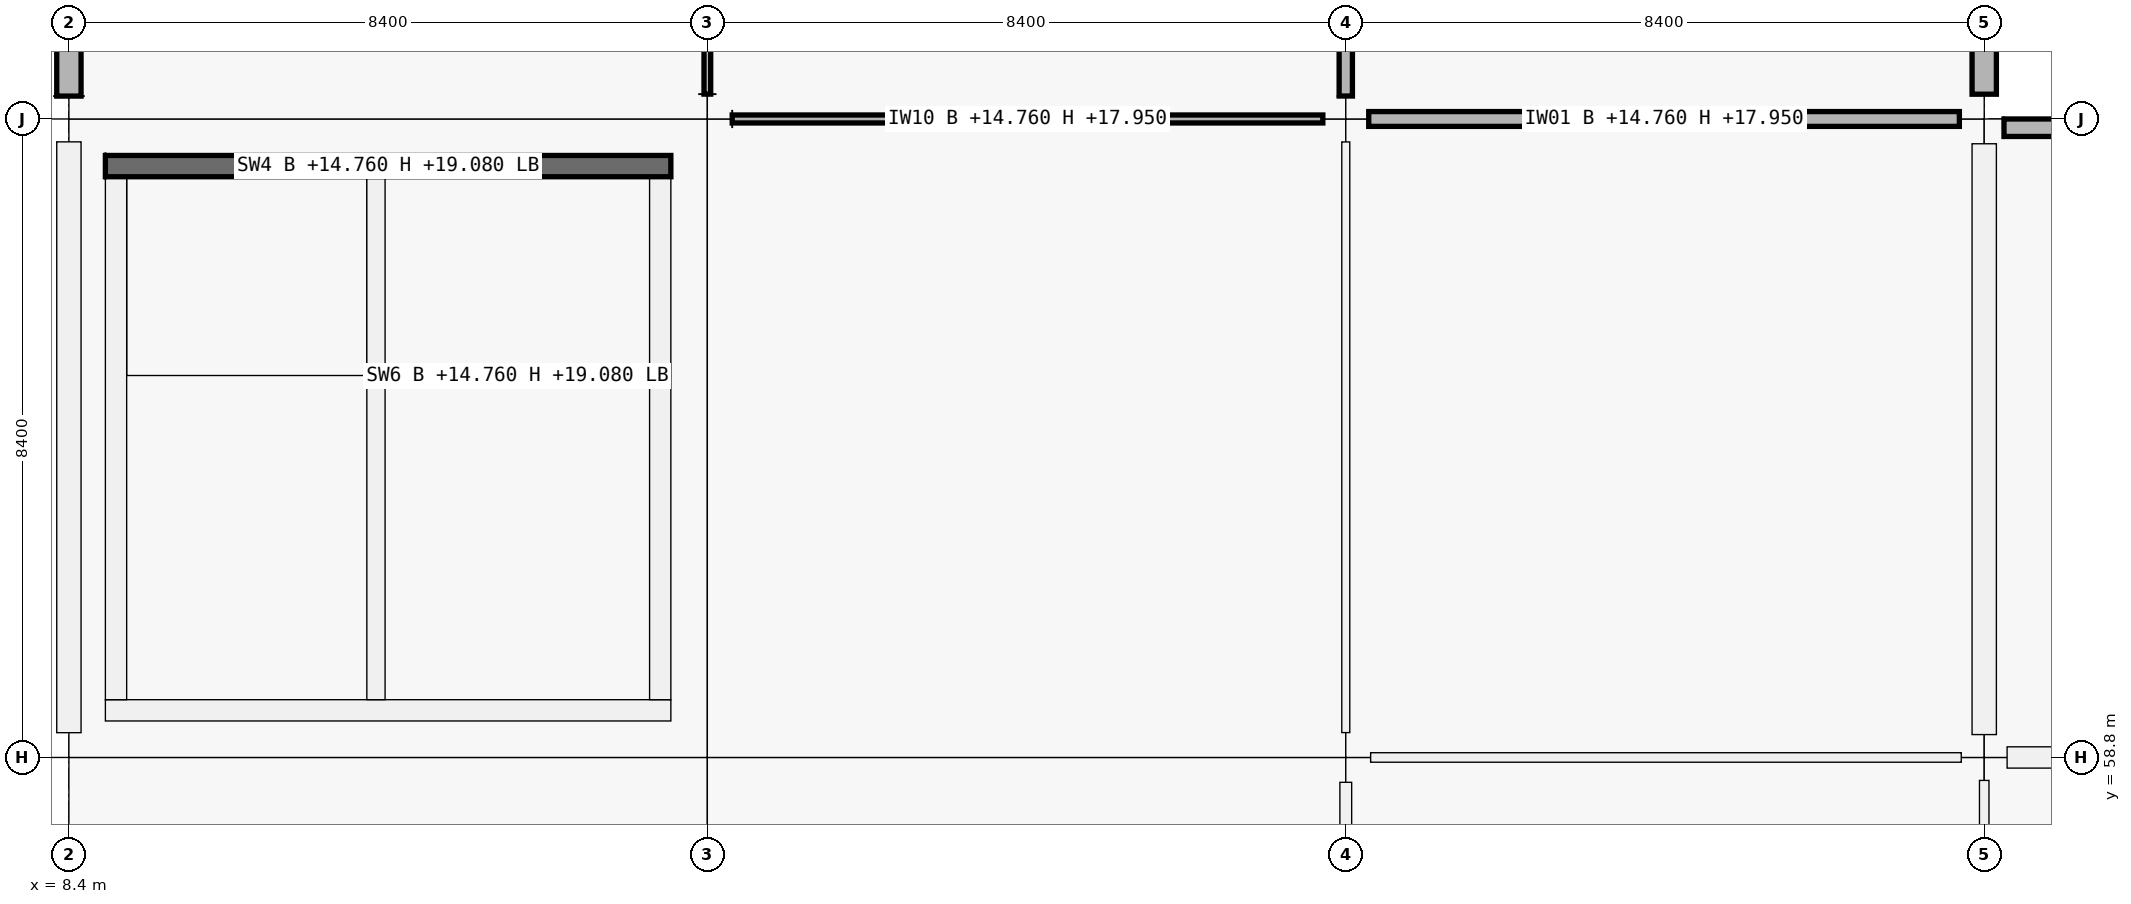
"""IFC4 building model, lengths in metres.
Left out: names, types, materials, properties, quantities, classifications, styles, units other than length and angle.
Written with IfcOpenShell. Run it as: python <this file> out.ifc"""

import sys

from ifc_helpers import new_model, si_unit, direction, frame, frame_2d, origin, origin_2d, place, context, subcontext, project, spatial, rectangle, extrude, element, fill, save


model = new_model("IFC4")
c1 = context("Model", 3, precision=1e-05, world=origin(), true_north=direction((0.0, 1.0)))
c2 = subcontext(c1, "Body", "Model", "MODEL_VIEW")
j1 = project(units=[si_unit("LENGTHUNIT", "METRE"), si_unit("PLANEANGLEUNIT", "RADIAN")], contexts=[c1])
p1 = place(None, origin())
s1 = spatial("IfcSite", under=j1, at=p1, CompositionType="ELEMENT")
p2 = place(p1, origin())
s2 = spatial("IfcBuilding", under=s1, at=p2, CompositionType="ELEMENT")
p3 = place(p2, frame((0.0, 0.0, 14.76)))
s3 = spatial("IfcBuildingStorey", under=s2, at=p3, CompositionType="ELEMENT", Elevation=14.76)
p4 = place(p3, frame((8.4, 58.8, 0.0), z_axis=(0.0, 0.0, 1.0), x_axis=(1.0, 0.0, 0.0)))
e1 = element("IfcColumn", 1, at=p4, inside=s3, PredefinedType="COLUMN", context=c2, shape_type="SweptSolid", body=[
    extrude(rectangle(XDim=0.65, YDim=0.65, at=origin_2d()), origin(), (0.0, 0.0, 1.0), 4.32),
])
for number, where, z_axis, x_axis in (
    (2, (8.4, 67.2, 0.0), (0.0, 0.0, 1.0), (1.0, 0.0, 0.0)),
    (3, (16.8, 58.8, 0.0), (0.0, 0.0, 1.0), (1.0, 0.0, 0.0)),
):
    element("IfcColumn", number, at=place(p3, frame(where, z_axis=z_axis, x_axis=x_axis)), inside=s3, PredefinedType="COLUMN", context=c2, shape_type="SweptSolid", body=[
        extrude(rectangle(XDim=0.6, YDim=0.6, at=origin_2d()), origin(), (0.0, 0.0, 1.0), 4.32),
    ])
for number, where, z_axis, x_axis in (
    (4, (16.8, 67.2, 0.0), (0.0, 0.0, 1.0), (1.0, 0.0, 0.0)),
    (5, (25.2, 58.8, 0.0), (0.0, 0.0, 1.0), (1.0, 0.0, 0.0)),
):
    element("IfcColumn", number, at=place(p3, frame(where, z_axis=z_axis, x_axis=x_axis)), inside=s3, PredefinedType="COLUMN", context=c2, shape_type="SweptSolid", body=[
        extrude(rectangle(XDim=0.65, YDim=0.65, at=origin_2d()), origin(), (0.0, 0.0, 1.0), 4.32),
    ])
for number, where, z_axis, x_axis in (
    (6, (25.2, 67.2, 0.0), (0.0, 0.0, 1.0), (1.0, 0.0, 0.0)),
    (7, (33.6, 58.8, 0.0), (0.0, 0.0, 1.0), (1.0, 0.0, 0.0)),
):
    element("IfcColumn", number, at=place(p3, frame(where, z_axis=z_axis, x_axis=x_axis)), inside=s3, PredefinedType="COLUMN", context=c2, shape_type="SweptSolid", body=[
        extrude(rectangle(XDim=0.6, YDim=0.6, at=origin_2d()), origin(), (0.0, 0.0, 1.0), 4.32),
    ])
p5 = place(p3, frame((33.6, 67.2, 0.0), z_axis=(0.0, 0.0, 1.0), x_axis=(1.0, 0.0, 0.0)))
e8 = element("IfcColumn", 8, at=p5, inside=s3, PredefinedType="COLUMN", context=c2, shape_type="SweptSolid", body=[
    extrude(rectangle(XDim=0.65, YDim=0.65, at=origin_2d()), origin(), (0.0, 0.0, 1.0), 4.32),
])
p6 = place(p3, frame((8.4, 59.126, 0.0), z_axis=(0.0, 0.0, 1.0), x_axis=(0.0, 1.0, 0.0)))
e9 = element("IfcWall", 9, at=p6, inside=s3, PredefinedType="SOLIDWALL", context=c2, shape_type="SweptSolid", body=[
    extrude(rectangle(XDim=7.773, YDim=0.32, at=frame_2d((3.886, 0.0))), origin(), (0.0, 0.0, 1.0), 3.37),
])
p7 = place(p3, frame((8.4, 67.501, 0.0), z_axis=(0.0, 0.0, 1.0), x_axis=(0.0, 1.0, 0.0)))
e10 = element("IfcWall", 10, at=p7, inside=s3, PredefinedType="SOLIDWALL", context=c2, shape_type="SweptSolid", body=[
    extrude(rectangle(XDim=7.773, YDim=0.32, at=frame_2d((3.886, 0.0))), origin(), (0.0, 0.0, 1.0), 3.37),
])
p8 = place(p7, frame((2.786, 0.0, 0.9)))
e11 = element("IfcOpeningElement", 11, at=p8, cuts=e10, PredefinedType="OPENING", context=c2, shape_type="SweptSolid", body=[
    extrude(rectangle(XDim=2.2, YDim=1.35, at=frame_2d((1.1, 0.675))), frame((0.0, 0.16, 0.0), z_axis=(0.0, -1.0, 0.0), x_axis=(1.0, 0.0, 0.0)), (0.0, 0.0, 1.0), 0.32),
])
p9 = place(p3, frame((33.6, 66.874, 0.0), z_axis=(0.0, 0.0, 1.0), x_axis=(0.0, -1.0, 0.0)))
e12 = element("IfcWall", 12, at=p9, inside=s3, PredefinedType="SOLIDWALL", context=c2, shape_type="SweptSolid", body=[
    extrude(rectangle(XDim=7.773, YDim=0.32, at=frame_2d((3.886, 0.0))), origin(), (0.0, 0.0, 1.0), 3.37),
])
p10 = place(p9, frame((2.286, 0.0, 0.9)))
e13 = element("IfcOpeningElement", 13, at=p10, cuts=e12, PredefinedType="OPENING", context=c2, shape_type="SweptSolid", body=[
    extrude(rectangle(XDim=3.2, YDim=1.75, at=frame_2d((1.6, 0.875))), frame((0.0, 0.16, 0.0), z_axis=(0.0, -1.0, 0.0), x_axis=(1.0, 0.0, 0.0)), (0.0, 0.0, 1.0), 0.32),
])
p11 = place(p3, frame((33.6, 75.299, 0.0), z_axis=(0.0, 0.0, 1.0), x_axis=(0.0, -1.0, 0.0)))
e14 = element("IfcWall", 14, at=p11, inside=s3, PredefinedType="SOLIDWALL", context=c2, shape_type="SweptSolid", body=[
    extrude(rectangle(XDim=7.773, YDim=0.32, at=frame_2d((3.887, 0.0))), origin(), (0.0, 0.0, 1.0), 3.37),
])
p12 = place(p3, frame((33.901, 58.8, 0.0), z_axis=(0.0, 0.0, 1.0), x_axis=(1.0, 0.0, 0.0)))
e15 = element("IfcWall", 15, at=p12, inside=s3, PredefinedType="SOLIDWALL", context=c2, shape_type="SweptSolid", body=[
    extrude(rectangle(XDim=7.823, YDim=0.28, at=frame_2d((3.912, 0.0))), origin(), (0.0, 0.0, 1.0), 3.37),
])
p13 = place(p3, frame((33.86, 67.085, 0.0), z_axis=(0.0, 0.0, 1.0), x_axis=(1.0, 0.0, 0.0)))
e16 = element("IfcWall", 16, at=p13, inside=s3, PredefinedType="PARAPET", context=c2, shape_type="SweptSolid", body=[
    extrude(rectangle(XDim=7.88, YDim=0.23, at=frame_2d((3.94, 0.0))), origin(), (0.0, 0.0, 1.0), 0.95),
])
p14 = place(p3, frame((16.32, 59.42, 0.0), z_axis=(0.0, 0.0, 1.0), x_axis=(-1.0, 0.0, 0.0)))
e17 = element("IfcWall", 17, at=p14, inside=s3, PredefinedType="SHEAR", context=c2, shape_type="SweptSolid", body=[
    extrude(rectangle(XDim=7.44, YDim=0.28, at=frame_2d((3.72, 0.0))), origin(), (0.0, 0.0, 1.0), 4.32),
])
p15 = place(p14, frame((1.28, 0.0, 0.0)))
e18 = element("IfcOpeningElement", 18, at=p15, cuts=e17, PredefinedType="OPENING", context=c2, shape_type="SweptSolid", body=[
    extrude(rectangle(XDim=1.5, YDim=2.15, at=frame_2d((0.75, 1.075))), frame((0.0, 0.14, 0.0), z_axis=(0.0, -1.0, 0.0), x_axis=(1.0, 0.0, 0.0)), (0.0, 0.0, 1.0), 0.28),
])
p16 = place(p3, frame((9.02, 59.56, 0.0), z_axis=(0.0, 0.0, 1.0), x_axis=(0.0, 1.0, 0.0)))
e19 = element("IfcWall", 19, at=p16, inside=s3, PredefinedType="SHEAR", context=c2, shape_type="SweptSolid", body=[
    extrude(rectangle(XDim=6.88, YDim=0.28, at=frame_2d((3.44, 0.0))), origin(), (0.0, 0.0, 1.0), 4.32),
])
p17 = place(p3, frame((8.88, 66.58, 0.0), z_axis=(0.0, 0.0, 1.0), x_axis=(1.0, 0.0, 0.0)))
e20 = element("IfcWall", 20, at=p17, inside=s3, PredefinedType="SHEAR", context=c2, shape_type="SweptSolid", body=[
    extrude(rectangle(XDim=7.44, YDim=0.28, at=frame_2d((3.72, 0.0))), origin(), (0.0, 0.0, 1.0), 4.32),
])
p18 = place(p3, frame((16.18, 66.44, 0.0), z_axis=(0.0, 0.0, 1.0), x_axis=(0.0, -1.0, 0.0)))
e21 = element("IfcWall", 21, at=p18, inside=s3, PredefinedType="SHEAR", context=c2, shape_type="SweptSolid", body=[
    extrude(rectangle(XDim=6.88, YDim=0.28, at=frame_2d((3.44, 0.0))), origin(), (0.0, 0.0, 1.0), 4.32),
])
p19 = place(p3, frame((12.44, 59.56, 0.0), z_axis=(0.0, 0.0, 1.0), x_axis=(0.0, 1.0, 0.0)))
e22 = element("IfcWall", 22, at=p19, inside=s3, PredefinedType="SHEAR", context=c2, shape_type="SweptSolid", body=[
    extrude(rectangle(XDim=6.88, YDim=0.24, at=frame_2d((3.44, 0.0))), origin(), (0.0, 0.0, 1.0), 4.32),
])
p20 = place(p19, frame((0.12, 0.0, 0.0)))
e23 = element("IfcOpeningElement", 23, at=p20, cuts=e22, PredefinedType="OPENING", context=c2, shape_type="SweptSolid", body=[
    extrude(rectangle(XDim=1.0, YDim=2.15, at=frame_2d((0.5, 1.075))), frame((0.0, 0.12, 0.0), z_axis=(0.0, -1.0, 0.0), x_axis=(1.0, 0.0, 0.0)), (0.0, 0.0, 1.0), 0.24),
])
p21 = place(p3, frame((12.56, 63.82, 0.0), z_axis=(0.0, 0.0, 1.0), x_axis=(1.0, 0.0, 0.0)))
e24 = element("IfcWall", 24, at=p21, inside=s3, PredefinedType="SHEAR", context=c2, shape_type="SweptSolid", body=[
    extrude(rectangle(XDim=3.48, YDim=0.24, at=frame_2d((1.74, 0.0))), origin(), (0.0, 0.0, 1.0), 4.32),
])
p22 = place(p21, frame((1.19, 0.0, 0.0)))
e25 = element("IfcOpeningElement", 25, at=p22, cuts=e24, PredefinedType="OPENING", context=c2, shape_type="SweptSolid", body=[
    extrude(rectangle(XDim=1.1, YDim=2.15, at=frame_2d((0.55, 1.075))), frame((0.0, 0.12, 0.0), z_axis=(0.0, -1.0, 0.0), x_axis=(1.0, 0.0, 0.0)), (0.0, 0.0, 1.0), 0.24),
])
p23 = place(p3, frame((17.127, 67.2, 0.0), z_axis=(0.0, 0.0, 1.0), x_axis=(1.0, 0.0, 0.0)))
e26 = element("IfcWall", 26, at=p23, inside=s3, PredefinedType="PARTITIONING", context=c2, shape_type="SweptSolid", body=[
    extrude(rectangle(XDim=7.771, YDim=0.105, at=frame_2d((3.885, 0.0))), origin(), (0.0, 0.0, 1.0), 3.19),
])
p24 = place(p23, frame((3.356, 0.0, 0.0)))
e27 = element("IfcOpeningElement", 27, at=p24, cuts=e26, PredefinedType="OPENING", context=c2, shape_type="SweptSolid", body=[
    extrude(rectangle(XDim=1.06, YDim=2.25, at=frame_2d((0.53, 1.125))), frame((0.0, 0.052, 0.0), z_axis=(0.0, -1.0, 0.0), x_axis=(1.0, 0.0, 0.0)), (0.0, 0.0, 1.0), 0.105),
])
p25 = place(p3, frame((25.527, 58.8, 0.0), z_axis=(0.0, 0.0, 1.0), x_axis=(1.0, 0.0, 0.0)))
e28 = element("IfcWall", 28, at=p25, inside=s3, PredefinedType="PARTITIONING", context=c2, shape_type="SweptSolid", body=[
    extrude(rectangle(XDim=7.771, YDim=0.125, at=frame_2d((3.885, 0.0))), origin(), (0.0, 0.0, 1.0), 3.19),
])
p26 = place(p25, frame((3.401, 0.0, 0.0)))
e29 = element("IfcOpeningElement", 29, at=p26, cuts=e28, PredefinedType="OPENING", context=c2, shape_type="SweptSolid", body=[
    extrude(rectangle(XDim=0.97, YDim=2.12, at=frame_2d((0.485, 1.06))), frame((0.0, 0.062, 0.0), z_axis=(0.0, -1.0, 0.0), x_axis=(1.0, 0.0, 0.0)), (0.0, 0.0, 1.0), 0.125),
])
p27 = place(p3, frame((25.502, 67.2, 0.0), z_axis=(0.0, 0.0, 1.0), x_axis=(1.0, 0.0, 0.0)))
e30 = element("IfcWall", 30, at=p27, inside=s3, PredefinedType="PARTITIONING", context=c2, shape_type="SweptSolid", body=[
    extrude(rectangle(XDim=7.771, YDim=0.195, at=frame_2d((3.885, 0.0))), origin(), (0.0, 0.0, 1.0), 3.19),
])
p28 = place(p27, frame((3.401, 0.0, 0.0)))
e31 = element("IfcOpeningElement", 31, at=p28, cuts=e30, PredefinedType="OPENING", context=c2, shape_type="SweptSolid", body=[
    extrude(rectangle(XDim=0.97, YDim=2.12, at=frame_2d((0.485, 1.06))), frame((0.0, 0.098, 0.0), z_axis=(0.0, -1.0, 0.0), x_axis=(1.0, 0.0, 0.0)), (0.0, 0.0, 1.0), 0.195),
])
p29 = place(p3, frame((16.8, 67.527, 0.0), z_axis=(0.0, 0.0, 1.0), x_axis=(0.0, 1.0, 0.0)))
e32 = element("IfcWall", 32, at=p29, inside=s3, PredefinedType="PARTITIONING", context=c2, shape_type="SweptSolid", body=[
    extrude(rectangle(XDim=7.771, YDim=0.088, at=frame_2d((3.885, 0.0))), origin(), (0.0, 0.0, 1.0), 3.19),
])
p30 = place(p29, frame((3.356, 0.0, 0.0)))
e33 = element("IfcOpeningElement", 33, at=p30, cuts=e32, PredefinedType="OPENING", context=c2, shape_type="SweptSolid", body=[
    extrude(rectangle(XDim=1.06, YDim=2.25, at=frame_2d((0.53, 1.125))), frame((0.0, 0.044, 0.0), z_axis=(0.0, -1.0, 0.0), x_axis=(1.0, 0.0, 0.0)), (0.0, 0.0, 1.0), 0.088),
])
p31 = place(p3, frame((25.2, 50.702, 0.0), z_axis=(0.0, 0.0, 1.0), x_axis=(0.0, 1.0, 0.0)))
e34 = element("IfcWall", 34, at=p31, inside=s3, PredefinedType="PARTITIONING", context=c2, shape_type="SweptSolid", body=[
    extrude(rectangle(XDim=7.771, YDim=0.155, at=frame_2d((3.885, 0.0))), origin(), (0.0, 0.0, 1.0), 3.19),
])
p32 = place(p31, frame((3.385, 0.0, 0.0)))
e35 = element("IfcOpeningElement", 35, at=p32, cuts=e34, PredefinedType="OPENING", context=c2, shape_type="SweptSolid", body=[
    extrude(rectangle(XDim=1.0, YDim=2.2, at=frame_2d((0.5, 1.1))), frame((0.0, 0.078, 0.0), z_axis=(0.0, -1.0, 0.0), x_axis=(1.0, 0.0, 0.0)), (0.0, 0.0, 1.0), 0.155),
])
p33 = place(p3, frame((25.2, 59.127, 0.0), z_axis=(0.0, 0.0, 1.0), x_axis=(0.0, 1.0, 0.0)))
e36 = element("IfcWall", 36, at=p33, inside=s3, PredefinedType="PARTITIONING", context=c2, shape_type="SweptSolid", body=[
    extrude(rectangle(XDim=7.771, YDim=0.105, at=frame_2d((3.885, 0.0))), origin(), (0.0, 0.0, 1.0), 3.19),
])
p34 = place(p33, frame((3.396, 0.0, 0.0)))
e37 = element("IfcOpeningElement", 37, at=p34, cuts=e36, PredefinedType="OPENING", context=c2, shape_type="SweptSolid", body=[
    extrude(rectangle(XDim=0.98, YDim=2.18, at=frame_2d((0.49, 1.09))), frame((0.0, 0.052, 0.0), z_axis=(0.0, -1.0, 0.0), x_axis=(1.0, 0.0, 0.0)), (0.0, 0.0, 1.0), 0.105),
])
p35 = place(p3, frame((25.2, 67.502, 0.0), z_axis=(0.0, 0.0, 1.0), x_axis=(0.0, 1.0, 0.0)))
e38 = element("IfcWall", 38, at=p35, inside=s3, PredefinedType="PARTITIONING", context=c2, shape_type="SweptSolid", body=[
    extrude(rectangle(XDim=7.771, YDim=0.175, at=frame_2d((3.885, 0.0))), origin(), (0.0, 0.0, 1.0), 3.19),
])
p36 = place(p35, frame((3.356, 0.0, 0.0)))
e39 = element("IfcOpeningElement", 39, at=p36, cuts=e38, PredefinedType="OPENING", context=c2, shape_type="SweptSolid", body=[
    extrude(rectangle(XDim=1.06, YDim=2.25, at=frame_2d((0.53, 1.125))), frame((0.0, 0.087, 0.0), z_axis=(0.0, -1.0, 0.0), x_axis=(1.0, 0.0, 0.0)), (0.0, 0.0, 1.0), 0.175),
])
p37 = place(p3, frame((33.6, 50.727, 0.0), z_axis=(0.0, 0.0, 1.0), x_axis=(0.0, 1.0, 0.0)))
e40 = element("IfcWall", 40, at=p37, inside=s3, PredefinedType="PARTITIONING", context=c2, shape_type="SweptSolid", body=[
    extrude(rectangle(XDim=7.771, YDim=0.125, at=frame_2d((3.885, 0.0))), origin(), (0.0, 0.0, 1.0), 3.19),
])
p38 = place(p37, frame((3.365, 0.0, 0.0)))
e41 = element("IfcOpeningElement", 41, at=p38, cuts=e40, PredefinedType="OPENING", context=c2, shape_type="SweptSolid", body=[
    extrude(rectangle(XDim=1.04, YDim=2.2, at=frame_2d((0.52, 1.1))), frame((0.0, 0.062, 0.0), z_axis=(0.0, -1.0, 0.0), x_axis=(1.0, 0.0, 0.0)), (0.0, 0.0, 1.0), 0.125),
])
p39 = place(p10, origin())
e42 = element("IfcWindow", 42, at=p39, inside=s3, PartitioningType="SINGLE_PANEL", PredefinedType="WINDOW", context=c2, shape_type="SweptSolid", body=[
    extrude(rectangle(XDim=3.2, YDim=1.75, at=frame_2d((1.6, 0.875))), frame((0.0, 0.03, 0.0), z_axis=(0.0, -1.0, 0.0), x_axis=(1.0, 0.0, 0.0)), (0.0, 0.0, 1.0), 0.06),
])
fill(e13, e42)
p40 = place(p20, origin())
e43 = element("IfcDoor", 43, at=p40, inside=s3, OperationType="SINGLE_SWING_LEFT", PredefinedType="DOOR", context=c2, shape_type="SweptSolid", body=[
    extrude(rectangle(XDim=1.0, YDim=2.15, at=frame_2d((0.5, 1.075))), frame((0.0, 0.025, 0.0), z_axis=(0.0, -1.0, 0.0), x_axis=(1.0, 0.0, 0.0)), (0.0, 0.0, 1.0), 0.05),
])
fill(e23, e43)
p41 = place(p15, origin())
e44 = element("IfcDoor", 44, at=p41, inside=s3, OperationType="DOUBLE_DOOR_SINGLE_SWING", PredefinedType="DOOR", context=c2, shape_type="SweptSolid", body=[
    extrude(rectangle(XDim=1.5, YDim=2.15, at=frame_2d((0.75, 1.075))), frame((0.0, 0.025, 0.0), z_axis=(0.0, -1.0, 0.0), x_axis=(1.0, 0.0, 0.0)), (0.0, 0.0, 1.0), 0.05),
])
fill(e18, e44)
p42 = place(p22, origin())
e45 = element("IfcDoor", 45, at=p42, inside=s3, OperationType="DOUBLE_DOOR_SLIDING", PredefinedType="DOOR", context=c2, shape_type="SweptSolid", body=[
    extrude(rectangle(XDim=1.1, YDim=2.15, at=frame_2d((0.55, 1.075))), frame((0.0, 0.025, 0.0), z_axis=(0.0, -1.0, 0.0), x_axis=(1.0, 0.0, 0.0)), (0.0, 0.0, 1.0), 0.05),
])
fill(e25, e45)
p43 = place(p24, origin())
e46 = element("IfcDoor", 46, at=p43, inside=s3, OperationType="SINGLE_SWING_LEFT", PredefinedType="DOOR", context=c2, shape_type="SweptSolid", body=[
    extrude(rectangle(XDim=1.06, YDim=2.25, at=frame_2d((0.53, 1.125))), frame((0.0, 0.025, 0.0), z_axis=(0.0, -1.0, 0.0), x_axis=(1.0, 0.0, 0.0)), (0.0, 0.0, 1.0), 0.05),
])
fill(e27, e46)
p44 = place(p34, origin())
e47 = element("IfcDoor", 47, at=p44, inside=s3, OperationType="SINGLE_SWING_RIGHT", PredefinedType="DOOR", context=c2, shape_type="SweptSolid", body=[
    extrude(rectangle(XDim=0.98, YDim=2.18, at=frame_2d((0.49, 1.09))), frame((0.0, 0.025, 0.0), z_axis=(0.0, -1.0, 0.0), x_axis=(1.0, 0.0, 0.0)), (0.0, 0.0, 1.0), 0.05),
])
fill(e37, e47)
p45 = place(p28, origin())
e48 = element("IfcDoor", 48, at=p45, inside=s3, OperationType="SINGLE_SWING_RIGHT", PredefinedType="DOOR", context=c2, shape_type="SweptSolid", body=[
    extrude(rectangle(XDim=0.97, YDim=2.12, at=frame_2d((0.485, 1.06))), frame((0.0, 0.025, 0.0), z_axis=(0.0, -1.0, 0.0), x_axis=(1.0, 0.0, 0.0)), (0.0, 0.0, 1.0), 0.05),
])
fill(e31, e48)
p46 = place(p26, origin())
e49 = element("IfcDoor", 49, at=p46, inside=s3, OperationType="SINGLE_SWING_LEFT", PredefinedType="DOOR", context=c2, shape_type="SweptSolid", body=[
    extrude(rectangle(XDim=0.97, YDim=2.12, at=frame_2d((0.485, 1.06))), frame((0.0, 0.025, 0.0), z_axis=(0.0, -1.0, 0.0), x_axis=(1.0, 0.0, 0.0)), (0.0, 0.0, 1.0), 0.05),
])
fill(e29, e49)
save(model, sys.argv[1])
